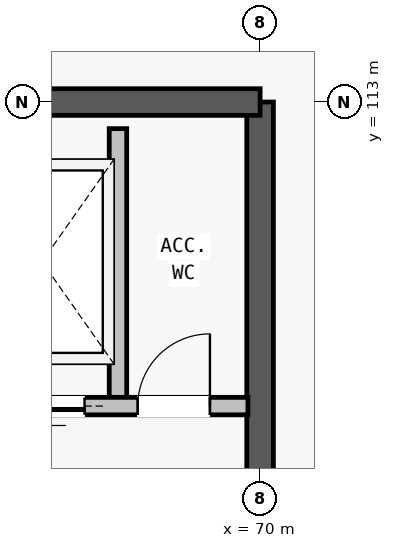
"""IFC4 building model, lengths in metres.
Left out: names, types, materials, properties, quantities, classifications, styles, units other than length and angle.
Written with IfcOpenShell. Run it as: python <this file> out.ifc"""

import sys

from ifc_helpers import new_model, si_unit, direction, frame, frame_2d, origin, place, context, subcontext, project, spatial, rectangle, extrude, element, fill, save


model = new_model("IFC4")
c1 = context("Model", 3, precision=1e-05, world=origin(), true_north=direction((0.0, 1.0)))
c2 = subcontext(c1, "Body", "Model", "MODEL_VIEW")
j1 = project(units=[si_unit("LENGTHUNIT", "METRE"), si_unit("PLANEANGLEUNIT", "RADIAN")], contexts=[c1])
p1 = place(None, origin())
s1 = spatial("IfcSite", under=j1, at=p1, CompositionType="ELEMENT")
p2 = place(p1, origin())
s2 = spatial("IfcBuilding", under=s1, at=p2, CompositionType="ELEMENT")
p3 = place(p2, frame((0.0, 0.0, 21.2)))
s3 = spatial("IfcBuildingStorey", under=s2, at=p3, CompositionType="ELEMENT", Elevation=21.2)
p4 = place(p3, frame((70.0, 104.0, 0.0), z_axis=(0.0, 0.0, 1.0), x_axis=(0.0, 1.0, 0.0)))
e1 = element("IfcWall", 1, at=p4, inside=s3, PredefinedType="SHEAR", context=c2, shape_type="SweptSolid", body=[
    extrude(rectangle(XDim=9.0, YDim=0.35, at=frame_2d((4.5, 0.0))), origin(), (0.0, 0.0, 1.0), 3.62),
])
p5 = place(p4, frame((1.4, 0.0, 0.0)))
e2 = element("IfcOpeningElement", 2, at=p5, cuts=e1, PredefinedType="OPENING", context=c2, shape_type="SweptSolid", body=[
    extrude(rectangle(XDim=1.9, YDim=2.3, at=frame_2d((0.95, 1.15))), frame((0.0, 0.185, 0.0), z_axis=(0.0, -1.0, 0.0), x_axis=(1.0, 0.0, 0.0)), (0.0, 0.0, 1.0), 0.37),
])
p6 = place(p3, frame((70.0, 113.0, 0.0), z_axis=(0.0, 0.0, 1.0), x_axis=(-1.0, 0.0, 0.0)))
e3 = element("IfcWall", 3, at=p6, inside=s3, PredefinedType="SHEAR", context=c2, shape_type="SweptSolid", body=[
    extrude(rectangle(XDim=8.0, YDim=0.35, at=frame_2d((4.0, 0.0))), origin(), (0.0, 0.0, 1.0), 3.62),
])
p7 = place(p3, frame((68.13, 109.0, 0.0), z_axis=(0.0, 0.0, 1.0), x_axis=(0.0, 1.0, 0.0)))
e4 = element("IfcWall", 4, at=p7, inside=s3, PredefinedType="PARTITIONING", context=c2, shape_type="SweptSolid", body=[
    extrude(rectangle(XDim=3.65, YDim=0.23, at=frame_2d((1.825, 0.0))), origin(), (0.0, 0.0, 1.0), 2.48),
])
p8 = place(p3, frame((66.21, 109.0, 0.0), z_axis=(0.0, 0.0, 1.0), x_axis=(1.0, 0.0, 0.0)))
e5 = element("IfcWall", 5, at=p8, inside=s3, PredefinedType="PARTITIONING", context=c2, shape_type="SweptSolid", body=[
    extrude(rectangle(XDim=3.63, YDim=0.23, at=frame_2d((1.815, 0.0))), origin(), (0.0, 0.0, 1.0), 2.48),
])
p9 = place(p8, frame((0.38, 0.0, 0.0)))
e6 = element("IfcOpeningElement", 6, at=p9, cuts=e5, PredefinedType="OPENING", context=c2, shape_type="SweptSolid", body=[
    extrude(rectangle(XDim=1.1, YDim=2.15, at=frame_2d((0.55, 1.075))), frame((0.0, 0.125, 0.0), z_axis=(0.0, -1.0, 0.0), x_axis=(1.0, 0.0, 0.0)), (0.0, 0.0, 1.0), 0.25),
])
p10 = place(p8, frame((2.18, 0.0, 0.0)))
e7 = element("IfcOpeningElement", 7, at=p10, cuts=e5, PredefinedType="OPENING", context=c2, shape_type="SweptSolid", body=[
    extrude(rectangle(XDim=0.95, YDim=2.1, at=frame_2d((0.475, 1.05))), frame((0.0, 0.125, 0.0), z_axis=(0.0, -1.0, 0.0), x_axis=(1.0, 0.0, 0.0)), (0.0, 0.0, 1.0), 0.25),
])
p11 = place(p9, origin())
e8 = element("IfcDoor", 8, at=p11, inside=s3, OperationType="SLIDING_TO_LEFT", PredefinedType="DOOR", context=c2, shape_type="SweptSolid", body=[
    extrude(rectangle(XDim=1.1, YDim=2.15, at=frame_2d((0.55, 1.075))), frame((0.0, 0.025, 0.0), z_axis=(0.0, -1.0, 0.0), x_axis=(1.0, 0.0, 0.0)), (0.0, 0.0, 1.0), 0.05),
])
fill(e6, e8)
p12 = place(p10, origin())
e9 = element("IfcDoor", 9, at=p12, inside=s3, OperationType="SINGLE_SWING_RIGHT", PredefinedType="DOOR", context=c2, shape_type="SweptSolid", body=[
    extrude(rectangle(XDim=0.95, YDim=2.1, at=frame_2d((0.475, 1.05))), frame((0.0, 0.025, 0.0), z_axis=(0.0, -1.0, 0.0), x_axis=(1.0, 0.0, 0.0)), (0.0, 0.0, 1.0), 0.05),
])
fill(e7, e9)
save(model, sys.argv[1])
